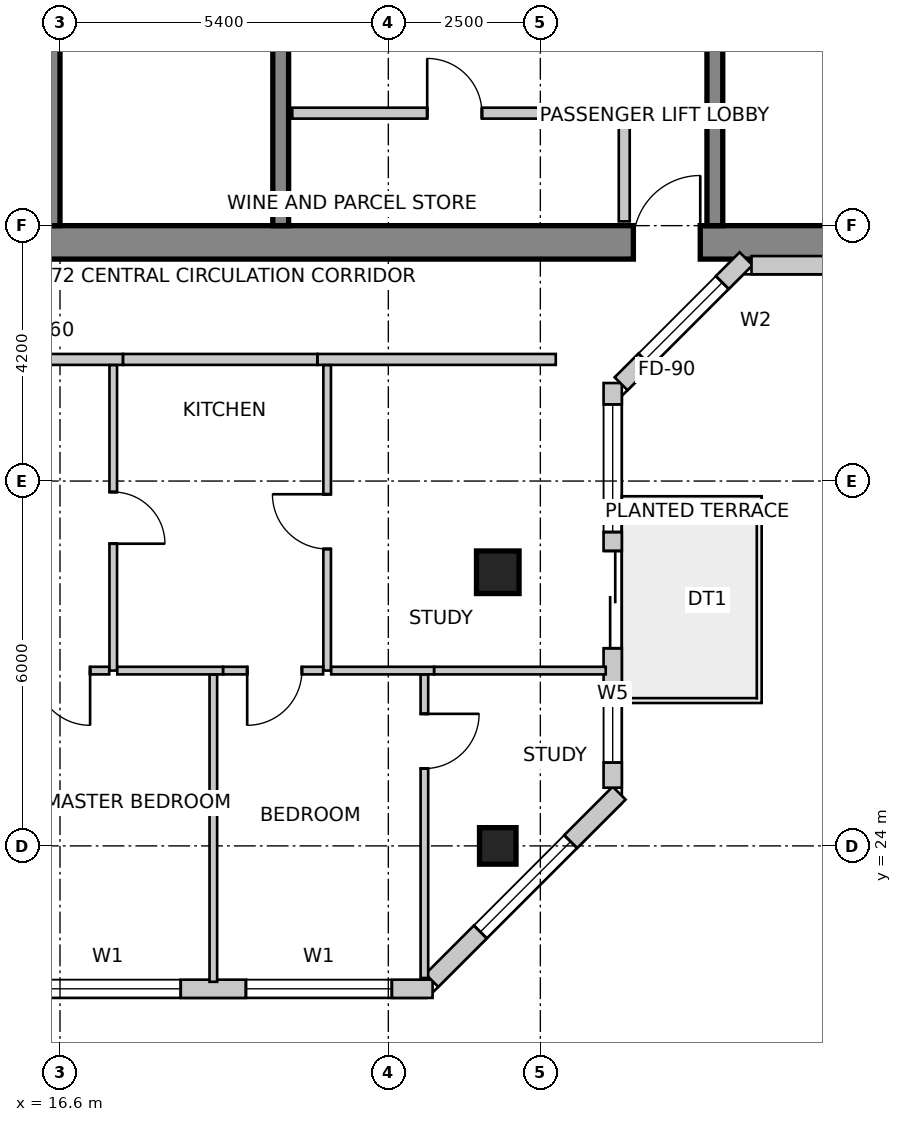
"""IFC4 building model, lengths in metres.
Left out: names, types, materials, properties, quantities, classifications, styles, units other than length and angle.
Written with IfcOpenShell. Run it as: python <this file> out.ifc"""

import sys

from ifc_helpers import new_model, si_unit, direction, frame, frame_2d, origin, origin_2d, place, context, subcontext, project, spatial, rectangle, extrude, source, transform, mapped, element, fill, save


model = new_model("IFC4")
c1 = context("Model", 3, precision=1e-05, world=origin(), true_north=direction((0.0, 1.0)))
c2 = subcontext(c1, "Body", "Model", "MODEL_VIEW")
j1 = project(units=[si_unit("LENGTHUNIT", "METRE"), si_unit("PLANEANGLEUNIT", "RADIAN")], contexts=[c1])
p1 = place(None, origin())
s1 = spatial("IfcSite", under=j1, at=p1, CompositionType="ELEMENT")
p2 = place(p1, origin())
s2 = spatial("IfcBuilding", under=s1, at=p2, CompositionType="ELEMENT")
p3 = place(p2, frame((0.0, 0.0, 281.7)))
s3 = spatial("IfcBuildingStorey", under=s2, at=p3, CompositionType="ELEMENT", Elevation=281.7)
p4 = place(p3, frame((16.05, 33.925, 0.0), z_axis=(0.0, 0.0, 1.0), x_axis=(1.0, 0.0, 0.0)))
e1 = element("IfcWall", 1, at=p4, inside=s3, PredefinedType="SHEAR", context=c2, shape_type="SweptSolid", body=[
    extrude(rectangle(XDim=15.5, YDim=0.55, at=frame_2d((7.75, 0.0))), origin(), (0.0, 0.0, 1.0), 3.6),
])
m1 = source(origin(), c2, "Body", "SweptSolid", [
    extrude(rectangle(XDim=1.1, YDim=2.15, at=frame_2d((0.55, 1.075))), frame((0.0, 0.285, 0.0), z_axis=(0.0, -1.0, 0.0), x_axis=(1.0, 0.0, 0.0)), (0.0, 0.0, 1.0), 0.57),
])
p5 = place(p4, frame((9.98, 0.0, 0.0)))
e2 = element("IfcOpeningElement", 2, at=p5, cuts=e1, PredefinedType="OPENING", context=c2, shape_type="MappedRepresentation", body=[
    mapped(m1, transform((0.0, 0.0, 0.0), scale=1.0)),
])
p6 = place(p3, frame((16.325, 34.2, 0.0), z_axis=(0.0, 0.0, 1.0), x_axis=(0.0, 1.0, 0.0)))
e3 = element("IfcWall", 3, at=p6, inside=s3, PredefinedType="SHEAR", context=c2, shape_type="SweptSolid", body=[
    extrude(rectangle(XDim=11.4, YDim=0.55, at=frame_2d((5.7, 0.0))), origin(), (0.0, 0.0, 1.0), 3.6),
])
p7 = place(p6, frame((7.15, 0.0, 0.0)))
e4 = element("IfcOpeningElement", 4, at=p7, cuts=e3, PredefinedType="OPENING", context=c2, shape_type="MappedRepresentation", body=[
    mapped(m1, transform((0.0, 0.0, 0.0), scale=1.0)),
])
p8 = place(p3, frame((20.23, 34.2, 0.0), z_axis=(0.0, 0.0, 1.0), x_axis=(0.0, 1.0, 0.0)))
e5 = element("IfcWall", 5, at=p8, inside=s3, PredefinedType="SHEAR", context=c2, shape_type="SweptSolid", body=[
    extrude(rectangle(XDim=9.06, YDim=0.26, at=frame_2d((4.53, 0.0))), origin(), (0.0, 0.0, 1.0), 3.6),
])
m2 = source(origin(), c2, "Body", "SweptSolid", [
    extrude(rectangle(XDim=1.1, YDim=2.15, at=frame_2d((0.55, 1.075))), frame((0.0, 0.14, 0.0), z_axis=(0.0, -1.0, 0.0), x_axis=(1.0, 0.0, 0.0)), (0.0, 0.0, 1.0), 0.28),
])
p9 = place(p8, frame((7.45, 0.0, 0.0)))
e6 = element("IfcOpeningElement", 6, at=p9, cuts=e5, PredefinedType="OPENING", context=c2, shape_type="MappedRepresentation", body=[
    mapped(m2, transform((0.0, 0.0, 0.0), scale=1.0)),
])
p10 = place(p3, frame((27.37, 34.2, 0.0), z_axis=(0.0, 0.0, 1.0), x_axis=(0.0, 1.0, 0.0)))
e7 = element("IfcWall", 7, at=p10, inside=s3, PredefinedType="SHEAR", context=c2, shape_type="SweptSolid", body=[
    extrude(rectangle(XDim=9.06, YDim=0.26, at=frame_2d((4.53, 0.0))), origin(), (0.0, 0.0, 1.0), 3.6),
])
p11 = place(p10, frame((7.45, 0.0, 0.0)))
e8 = element("IfcOpeningElement", 8, at=p11, cuts=e7, PredefinedType="OPENING", context=c2, shape_type="MappedRepresentation", body=[
    mapped(m2, transform((0.0, 0.0, 0.0), scale=1.0)),
])
m3 = source(origin(), c2, "Body", "SweptSolid", [
    extrude(rectangle(XDim=0.7, YDim=0.7, at=origin_2d()), origin(), (0.0, 0.0, 1.0), 3.6),
])
p12 = place(p3, frame((23.8, 28.5, 0.0), z_axis=(0.0, 0.0, 1.0), x_axis=(1.0, 0.0, 0.0)))
e9 = element("IfcColumn", 9, at=p12, inside=s3, PredefinedType="COLUMN", context=c2, shape_type="MappedRepresentation", body=[
    mapped(m3, transform((0.0, 0.0, 0.0), scale=1.0)),
])
m4 = source(origin(), c2, "Body", "SweptSolid", [
    extrude(rectangle(XDim=0.6, YDim=0.6, at=origin_2d()), origin(), (0.0, 0.0, 1.0), 3.6),
])
p13 = place(p3, frame((23.8, 24.0, 0.0), z_axis=(0.0, 0.0, 1.0), x_axis=(1.0, 0.0, 0.0)))
e10 = element("IfcColumn", 10, at=p13, inside=s3, PredefinedType="COLUMN", context=c2, shape_type="MappedRepresentation", body=[
    mapped(m4, transform((0.0, 0.0, 0.0), scale=1.0)),
])
p14 = place(p3, frame((12.086, 21.65, 0.0), z_axis=(0.0, 0.0, 1.0), x_axis=(1.0, 0.0, 0.0)))
e11 = element("IfcWall", 11, at=p14, inside=s3, PredefinedType="SOLIDWALL", context=c2, shape_type="SweptSolid", body=[
    extrude(rectangle(XDim=10.642, YDim=0.3, at=frame_2d((5.321, 0.0))), origin(), (0.0, 0.0, 1.0), 3.35),
])
m5 = source(origin(), c2, "Body", "SweptSolid", [
    extrude(rectangle(XDim=2.1, YDim=2.0, at=frame_2d((1.05, 1.0))), frame((0.0, 0.16, 0.0), z_axis=(0.0, -1.0, 0.0), x_axis=(1.0, 0.0, 0.0)), (0.0, 0.0, 1.0), 0.32),
])
p15 = place(p14, frame((1.139, 0.0, 0.85)))
e12 = element("IfcOpeningElement", 12, at=p15, cuts=e11, PredefinedType="OPENING", context=c2, shape_type="MappedRepresentation", body=[
    mapped(m5, transform((0.0, 0.0, 0.0), scale=1.0)),
])
m6 = source(origin(), c2, "Body", "SweptSolid", [
    extrude(rectangle(XDim=2.4, YDim=2.2, at=frame_2d((1.2, 1.1))), frame((0.0, 0.16, 0.0), z_axis=(0.0, -1.0, 0.0), x_axis=(1.0, 0.0, 0.0)), (0.0, 0.0, 1.0), 0.32),
])
p16 = place(p14, frame((4.1, 0.0, 0.85)))
e13 = element("IfcOpeningElement", 13, at=p16, cuts=e11, PredefinedType="OPENING", context=c2, shape_type="MappedRepresentation", body=[
    mapped(m6, transform((0.0, 0.0, 0.0), scale=1.0)),
])
p17 = place(p14, frame((7.572, 0.0, 0.85)))
e14 = element("IfcOpeningElement", 14, at=p17, cuts=e11, PredefinedType="OPENING", context=c2, shape_type="MappedRepresentation", body=[
    mapped(m6, transform((0.0, 0.0, 0.0), scale=1.0)),
])
p18 = place(p3, frame((22.716, 21.788, 0.0), z_axis=(0.0, 0.0, 1.0), x_axis=(0.707134803727, 0.707078757535, 0.0)))
e15 = element("IfcWall", 15, at=p18, inside=s3, PredefinedType="SOLIDWALL", context=c2, shape_type="SweptSolid", body=[
    extrude(rectangle(XDim=4.356, YDim=0.3, at=frame_2d((2.178, 0.0))), origin(), (0.0, 0.0, 1.0), 3.35),
])
p19 = place(p18, frame((1.128, 0.0, 0.85)))
e16 = element("IfcOpeningElement", 16, at=p19, cuts=e15, PredefinedType="OPENING", context=c2, shape_type="MappedRepresentation", body=[
    mapped(m5, transform((0.0, 0.0, 0.0), scale=1.0)),
])
p20 = place(p3, frame((25.69, 24.957, 0.0), z_axis=(0.0, 0.0, 1.0), x_axis=(0.0, 1.0, 0.0)))
e17 = element("IfcWall", 17, at=p20, inside=s3, PredefinedType="SOLIDWALL", context=c2, shape_type="SweptSolid", body=[
    extrude(rectangle(XDim=6.655, YDim=0.3, at=frame_2d((3.327, 0.0))), origin(), (0.0, 0.0, 1.0), 3.35),
])
m7 = source(origin(), c2, "Body", "SweptSolid", [
    extrude(rectangle(XDim=1.6, YDim=2.15, at=frame_2d((0.8, 1.075))), frame((0.0, 0.16, 0.0), z_axis=(0.0, -1.0, 0.0), x_axis=(1.0, 0.0, 0.0)), (0.0, 0.0, 1.0), 0.32),
])
p21 = place(p20, frame((2.293, 0.0, 0.0)))
e18 = element("IfcOpeningElement", 18, at=p21, cuts=e17, PredefinedType="OPENING", context=c2, shape_type="MappedRepresentation", body=[
    mapped(m7, transform((0.0, 0.0, 0.0), scale=1.0)),
])
m8 = source(origin(), c2, "Body", "SweptSolid", [
    extrude(rectangle(XDim=1.2, YDim=1.6, at=frame_2d((0.6, 0.8))), frame((0.0, 0.16, 0.0), z_axis=(0.0, -1.0, 0.0), x_axis=(1.0, 0.0, 0.0)), (0.0, 0.0, 1.0), 0.32),
])
p22 = place(p20, frame((0.413, 0.0, 0.85)))
e19 = element("IfcOpeningElement", 19, at=p22, cuts=e17, PredefinedType="OPENING", context=c2, shape_type="MappedRepresentation", body=[
    mapped(m8, transform((0.0, 0.0, 0.0), scale=1.0)),
])
p23 = place(p20, frame((4.204, 0.0, 0.85)))
e20 = element("IfcOpeningElement", 20, at=p23, cuts=e17, PredefinedType="OPENING", context=c2, shape_type="MappedRepresentation", body=[
    mapped(m5, transform((0.0, 0.0, 0.0), scale=1.0)),
])
p24 = place(p3, frame((25.828, 31.6, 0.0), z_axis=(0.0, 0.0, 1.0), x_axis=(0.707106781187, 0.707106781187, 0.0)))
e21 = element("IfcWall", 21, at=p24, inside=s3, PredefinedType="SOLIDWALL", context=c2, shape_type="SweptSolid", body=[
    extrude(rectangle(XDim=2.907, YDim=0.3, at=frame_2d((1.454, 0.0))), origin(), (0.0, 0.0, 1.0), 3.35),
])
m9 = source(origin(), c2, "Body", "SweptSolid", [
    extrude(rectangle(XDim=1.8, YDim=2.1, at=frame_2d((0.9, 1.05))), frame((0.0, 0.16, 0.0), z_axis=(0.0, -1.0, 0.0), x_axis=(1.0, 0.0, 0.0)), (0.0, 0.0, 1.0), 0.32),
])
p25 = place(p24, frame((0.554, 0.0, 0.85)))
e22 = element("IfcOpeningElement", 22, at=p25, cuts=e21, PredefinedType="OPENING", context=c2, shape_type="MappedRepresentation", body=[
    mapped(m9, transform((0.0, 0.0, 0.0), scale=1.0)),
])
p26 = place(p3, frame((27.973, 33.55, 0.0), z_axis=(0.0, 0.0, 1.0), x_axis=(1.0, 0.0, 0.0)))
e23 = element("IfcWall", 23, at=p26, inside=s3, PredefinedType="SOLIDWALL", context=c2, shape_type="SweptSolid", body=[
    extrude(rectangle(XDim=9.115, YDim=0.3, at=frame_2d((4.558, 0.0))), origin(), (0.0, 0.0, 1.0), 3.35),
])
p27 = place(p26, frame((1.239, 0.0, 0.85)))
e24 = element("IfcOpeningElement", 24, at=p27, cuts=e23, PredefinedType="OPENING", context=c2, shape_type="MappedRepresentation", body=[
    mapped(m6, transform((0.0, 0.0, 0.0), scale=1.0)),
])
p28 = place(p26, frame((5.626, 0.0, 0.85)))
e25 = element("IfcOpeningElement", 25, at=p28, cuts=e23, PredefinedType="OPENING", context=c2, shape_type="MappedRepresentation", body=[
    mapped(m5, transform((0.0, 0.0, 0.0), scale=1.0)),
])
p29 = place(p3, frame((20.42, 36.05, 0.0), z_axis=(0.0, 0.0, 1.0), x_axis=(1.0, 0.0, 0.0)))
e26 = element("IfcWall", 26, at=p29, inside=s3, PredefinedType="PARTITIONING", context=c2, shape_type="SweptSolid", body=[
    extrude(rectangle(XDim=5.46, YDim=0.18, at=frame_2d((2.73, 0.0))), origin(), (0.0, 0.0, 1.0), 3.35),
])
m10 = source(origin(), c2, "Body", "SweptSolid", [
    extrude(rectangle(XDim=0.9, YDim=2.15, at=frame_2d((0.45, 1.075))), frame((0.0, 0.1, 0.0), z_axis=(0.0, -1.0, 0.0), x_axis=(1.0, 0.0, 0.0)), (0.0, 0.0, 1.0), 0.2),
])
p30 = place(p29, frame((2.219, 0.0, 0.0)))
e27 = element("IfcOpeningElement", 27, at=p30, cuts=e26, PredefinedType="OPENING", context=c2, shape_type="MappedRepresentation", body=[
    mapped(m10, transform((0.0, 0.0, 0.0), scale=1.0)),
])
p31 = place(p3, frame((25.88, 35.956, 0.0), z_axis=(0.0, 0.0, 1.0), x_axis=(0.0, -1.0, 0.0)))
e28 = element("IfcWall", 28, at=p31, inside=s3, PredefinedType="PARTITIONING", context=c2, shape_type="SweptSolid", body=[
    extrude(rectangle(XDim=1.686, YDim=0.18, at=frame_2d((0.843, 0.0))), origin(), (0.0, 0.0, 1.0), 2.642),
])
p32 = place(p3, frame((24.754, 32.0, 0.0), z_axis=(0.0, 0.0, 1.0), x_axis=(-1.0, 0.0, 0.0)))
e29 = element("IfcWall", 29, at=p32, inside=s3, PredefinedType="PARTITIONING", context=c2, shape_type="SweptSolid", body=[
    extrude(rectangle(XDim=3.92, YDim=0.18, at=frame_2d((1.96, 0.0))), origin(), (0.0, 0.0, 1.0), 2.935),
])
p33 = place(p3, frame((17.636, 32.0, 0.0), z_axis=(0.0, 0.0, 1.0), x_axis=(-1.0, 0.0, 0.0)))
e30 = element("IfcWall", 30, at=p33, inside=s3, PredefinedType="PARTITIONING", context=c2, shape_type="SweptSolid", body=[
    extrude(rectangle(XDim=5.042, YDim=0.18, at=frame_2d((2.521, 0.0))), origin(), (0.0, 0.0, 1.0), 2.935),
])
p34 = place(p33, frame((2.009, 0.0, 0.0)))
e31 = element("IfcOpeningElement", 31, at=p34, cuts=e30, PredefinedType="OPENING", context=c2, shape_type="MappedRepresentation", body=[
    mapped(m10, transform((0.0, 0.0, 0.0), scale=1.0)),
])
p35 = place(p3, frame((20.832, 32.0, 0.0), z_axis=(0.0, 0.0, 1.0), x_axis=(-1.0, 0.0, 0.0)))
e32 = element("IfcWall", 32, at=p35, inside=s3, PredefinedType="PARTITIONING", context=c2, shape_type="SweptSolid", body=[
    extrude(rectangle(XDim=3.194, YDim=0.18, at=frame_2d((1.597, 0.0))), origin(), (0.0, 0.0, 1.0), 3.35),
])
p36 = place(p3, frame((20.994, 26.883, 0.0), z_axis=(0.0, 0.0, 1.0), x_axis=(0.0, 1.0, 0.0)))
e33 = element("IfcWall", 33, at=p36, inside=s3, PredefinedType="PARTITIONING", context=c2, shape_type="SweptSolid", body=[
    extrude(rectangle(XDim=5.023, YDim=0.125, at=frame_2d((2.511, 0.0))), origin(), (0.0, 0.0, 1.0), 2.935),
])
m11 = source(origin(), c2, "Body", "SweptSolid", [
    extrude(rectangle(XDim=0.9, YDim=2.15, at=frame_2d((0.45, 1.075))), frame((0.0, 0.073, 0.0), z_axis=(0.0, -1.0, 0.0), x_axis=(1.0, 0.0, 0.0)), (0.0, 0.0, 1.0), 0.145),
])
p37 = place(p36, frame((2.0, 0.0, 0.0)))
e34 = element("IfcOpeningElement", 34, at=p37, cuts=e33, PredefinedType="OPENING", context=c2, shape_type="MappedRepresentation", body=[
    mapped(m11, transform((0.0, 0.0, 0.0), scale=1.0)),
])
p38 = place(p3, frame((22.753, 26.883, 0.0), z_axis=(0.0, 0.0, 1.0), x_axis=(-1.0, 0.0, 0.0)))
e35 = element("IfcWall", 35, at=p38, inside=s3, PredefinedType="PARTITIONING", context=c2, shape_type="SweptSolid", body=[
    extrude(rectangle(XDim=1.692, YDim=0.125, at=frame_2d((0.846, 0.0))), origin(), (0.0, 0.0, 1.0), 3.35),
])
p39 = place(p3, frame((25.575, 26.883, 0.0), z_axis=(0.0, 0.0, 1.0), x_axis=(-1.0, 0.0, 0.0)))
e36 = element("IfcWall", 36, at=p39, inside=s3, PredefinedType="PARTITIONING", context=c2, shape_type="SweptSolid", body=[
    extrude(rectangle(XDim=2.82, YDim=0.125, at=frame_2d((1.41, 0.0))), origin(), (0.0, 0.0, 1.0), 2.642),
])
p40 = place(p3, frame((17.476, 31.906, 0.0), z_axis=(0.0, 0.0, 1.0), x_axis=(0.0, -1.0, 0.0)))
e37 = element("IfcWall", 37, at=p40, inside=s3, PredefinedType="PARTITIONING", context=c2, shape_type="SweptSolid", body=[
    extrude(rectangle(XDim=5.023, YDim=0.125, at=frame_2d((2.511, 0.0))), origin(), (0.0, 0.0, 1.0), 2.935),
])
m12 = source(origin(), c2, "Body", "SweptSolid", [
    extrude(rectangle(XDim=0.85, YDim=2.15, at=frame_2d((0.425, 1.075))), frame((0.0, 0.073, 0.0), z_axis=(0.0, -1.0, 0.0), x_axis=(1.0, 0.0, 0.0)), (0.0, 0.0, 1.0), 0.145),
])
p41 = place(p40, frame((2.086, 0.0, 0.0)))
e38 = element("IfcOpeningElement", 38, at=p41, cuts=e37, PredefinedType="OPENING", context=c2, shape_type="MappedRepresentation", body=[
    mapped(m12, transform((0.0, 0.0, 0.0), scale=1.0)),
])
p42 = place(p3, frame((17.409, 26.883, 0.0), z_axis=(0.0, 0.0, 1.0), x_axis=(-1.0, 0.0, 0.0)))
e39 = element("IfcWall", 39, at=p42, inside=s3, PredefinedType="PARTITIONING", context=c2, shape_type="SweptSolid", body=[
    extrude(rectangle(XDim=1.597, YDim=0.125, at=frame_2d((0.799, 0.0))), origin(), (0.0, 0.0, 1.0), 2.935),
])
p43 = place(p42, frame((0.314, 0.0, 0.0)))
e40 = element("IfcOpeningElement", 40, at=p43, cuts=e39, PredefinedType="OPENING", context=c2, shape_type="MappedRepresentation", body=[
    mapped(m11, transform((0.0, 0.0, 0.0), scale=1.0)),
])
p44 = place(p3, frame((19.282, 26.883, 0.0), z_axis=(0.0, 0.0, 1.0), x_axis=(-1.0, 0.0, 0.0)))
e41 = element("IfcWall", 41, at=p44, inside=s3, PredefinedType="PARTITIONING", context=c2, shape_type="SweptSolid", body=[
    extrude(rectangle(XDim=1.74, YDim=0.125, at=frame_2d((0.87, 0.0))), origin(), (0.0, 0.0, 1.0), 3.35),
])
p45 = place(p3, frame((20.927, 26.883, 0.0), z_axis=(0.0, 0.0, 1.0), x_axis=(-1.0, 0.0, 0.0)))
e42 = element("IfcWall", 42, at=p45, inside=s3, PredefinedType="PARTITIONING", context=c2, shape_type="SweptSolid", body=[
    extrude(rectangle(XDim=1.644, YDim=0.125, at=frame_2d((0.822, 0.0))), origin(), (0.0, 0.0, 1.0), 3.35),
])
p46 = place(p45, frame((0.349, 0.0, 0.0)))
e43 = element("IfcOpeningElement", 43, at=p46, cuts=e42, PredefinedType="OPENING", context=c2, shape_type="MappedRepresentation", body=[
    mapped(m11, transform((0.0, 0.0, 0.0), scale=1.0)),
])
p47 = place(p3, frame((19.122, 26.816, 0.0), z_axis=(0.0, 0.0, 1.0), x_axis=(0.0, -1.0, 0.0)))
e44 = element("IfcWall", 44, at=p47, inside=s3, PredefinedType="PARTITIONING", context=c2, shape_type="SweptSolid", body=[
    extrude(rectangle(XDim=5.052, YDim=0.125, at=frame_2d((2.526, 0.0))), origin(), (0.0, 0.0, 1.0), 2.935),
])
p48 = place(p3, frame((22.593, 26.816, 0.0), z_axis=(0.0, 0.0, 1.0), x_axis=(0.0, -1.0, 0.0)))
e45 = element("IfcWall", 45, at=p48, inside=s3, PredefinedType="PARTITIONING", context=c2, shape_type="SweptSolid", body=[
    extrude(rectangle(XDim=4.989, YDim=0.125, at=frame_2d((2.494, 0.0))), origin(), (0.0, 0.0, 1.0), 2.935),
])
p49 = place(p48, frame((0.645, 0.0, 0.0)))
e46 = element("IfcOpeningElement", 46, at=p49, cuts=e45, PredefinedType="OPENING", context=c2, shape_type="MappedRepresentation", body=[
    mapped(m11, transform((0.0, 0.0, 0.0), scale=1.0)),
])
m13 = source(origin(), c2, "Body", "SweptSolid", [
    extrude(rectangle(XDim=2.4, YDim=2.2, at=frame_2d((1.2, 1.1))), frame((0.0, -0.015, 0.0), z_axis=(0.0, -1.0, 0.0), x_axis=(1.0, 0.0, 0.0)), (0.0, 0.0, 1.0), 0.06),
])
p50 = place(p16, origin())
e47 = element("IfcWindow", 47, at=p50, inside=s3, PartitioningType="SINGLE_PANEL", PredefinedType="WINDOW", context=c2, shape_type="MappedRepresentation", body=[
    mapped(m13, transform((0.0, 0.0, 0.0), scale=1.0)),
])
fill(e13, e47)
p51 = place(p17, origin())
e48 = element("IfcWindow", 48, at=p51, inside=s3, PartitioningType="SINGLE_PANEL", PredefinedType="WINDOW", context=c2, shape_type="MappedRepresentation", body=[
    mapped(m13, transform((0.0, 0.0, 0.0), scale=1.0)),
])
fill(e14, e48)
m14 = source(origin(), c2, "Body", "SweptSolid", [
    extrude(rectangle(XDim=2.1, YDim=2.0, at=frame_2d((1.05, 1.0))), frame((0.0, -0.015, 0.0), z_axis=(0.0, -1.0, 0.0), x_axis=(1.0, 0.0, 0.0)), (0.0, 0.0, 1.0), 0.06),
])
p52 = place(p19, origin())
e49 = element("IfcWindow", 49, at=p52, inside=s3, PartitioningType="SINGLE_PANEL", PredefinedType="WINDOW", context=c2, shape_type="MappedRepresentation", body=[
    mapped(m14, transform((0.0, 0.0, 0.0), scale=1.0)),
])
fill(e16, e49)
m15 = source(origin(), c2, "Body", "SweptSolid", [
    extrude(rectangle(XDim=1.6, YDim=2.15, at=frame_2d((0.8, 1.075))), frame((0.0, 0.025, 0.0), z_axis=(0.0, -1.0, 0.0), x_axis=(1.0, 0.0, 0.0)), (0.0, 0.0, 1.0), 0.05),
])
p53 = place(p21, origin())
e50 = element("IfcDoor", 50, at=p53, inside=s3, OperationType="DOUBLE_DOOR_SLIDING", PredefinedType="DOOR", context=c2, shape_type="MappedRepresentation", body=[
    mapped(m15, transform((0.0, 0.0, 0.0), scale=1.0)),
])
fill(e18, e50)
m16 = source(origin(), c2, "Body", "SweptSolid", [
    extrude(rectangle(XDim=1.2, YDim=1.6, at=frame_2d((0.6, 0.8))), frame((0.0, -0.015, 0.0), z_axis=(0.0, -1.0, 0.0), x_axis=(1.0, 0.0, 0.0)), (0.0, 0.0, 1.0), 0.06),
])
p54 = place(p22, origin())
e51 = element("IfcWindow", 51, at=p54, inside=s3, PartitioningType="SINGLE_PANEL", PredefinedType="WINDOW", context=c2, shape_type="MappedRepresentation", body=[
    mapped(m16, transform((0.0, 0.0, 0.0), scale=1.0)),
])
fill(e19, e51)
p55 = place(p23, origin())
e52 = element("IfcWindow", 52, at=p55, inside=s3, PartitioningType="SINGLE_PANEL", PredefinedType="WINDOW", context=c2, shape_type="MappedRepresentation", body=[
    mapped(m14, transform((0.0, 0.0, 0.0), scale=1.0)),
])
fill(e20, e52)
m17 = source(origin(), c2, "Body", "SweptSolid", [
    extrude(rectangle(XDim=1.8, YDim=2.1, at=frame_2d((0.9, 1.05))), frame((0.0, -0.015, 0.0), z_axis=(0.0, -1.0, 0.0), x_axis=(1.0, 0.0, 0.0)), (0.0, 0.0, 1.0), 0.06),
])
p56 = place(p25, origin())
e53 = element("IfcWindow", 53, at=p56, inside=s3, PartitioningType="SINGLE_PANEL", PredefinedType="WINDOW", context=c2, shape_type="MappedRepresentation", body=[
    mapped(m17, transform((0.0, 0.0, 0.0), scale=1.0)),
])
fill(e22, e53)
m18 = source(origin(), c2, "Body", "SweptSolid", [
    extrude(rectangle(XDim=1.1, YDim=2.15, at=frame_2d((0.55, 1.075))), frame((0.0, 0.025, 0.0), z_axis=(0.0, -1.0, 0.0), x_axis=(1.0, 0.0, 0.0)), (0.0, 0.0, 1.0), 0.05),
])
p57 = place(p5, origin())
e54 = element("IfcDoor", 54, at=p57, inside=s3, OperationType="SINGLE_SWING_RIGHT", PredefinedType="DOOR", context=c2, shape_type="MappedRepresentation", body=[
    mapped(m18, transform((0.0, 0.0, 0.0), scale=1.0)),
])
fill(e2, e54)
m19 = source(origin(), c2, "Body", "SweptSolid", [
    extrude(rectangle(XDim=0.9, YDim=2.15, at=frame_2d((0.45, 1.075))), frame((0.0, 0.025, 0.0), z_axis=(0.0, -1.0, 0.0), x_axis=(1.0, 0.0, 0.0)), (0.0, 0.0, 1.0), 0.05),
])
p58 = place(p30, origin())
e55 = element("IfcDoor", 55, at=p58, inside=s3, OperationType="SINGLE_SWING_LEFT", PredefinedType="DOOR", context=c2, shape_type="MappedRepresentation", body=[
    mapped(m19, transform((0.0, 0.0, 0.0), scale=1.0)),
])
fill(e27, e55)
m20 = source(origin(), c2, "Body", "SweptSolid", [
    extrude(rectangle(XDim=0.9, YDim=2.15, at=frame_2d((0.45, 1.075))), frame((0.0, 0.025, 0.0), z_axis=(0.0, -1.0, 0.0), x_axis=(1.0, 0.0, 0.0)), (0.0, 0.0, 1.0), 0.05),
])
p59 = place(p37, origin())
e56 = element("IfcDoor", 56, at=p59, inside=s3, OperationType="SINGLE_SWING_RIGHT", PredefinedType="DOOR", context=c2, shape_type="MappedRepresentation", body=[
    mapped(m20, transform((0.0, 0.0, 0.0), scale=1.0)),
])
fill(e34, e56)
m21 = source(origin(), c2, "Body", "SweptSolid", [
    extrude(rectangle(XDim=0.85, YDim=2.15, at=frame_2d((0.425, 1.075))), frame((0.0, 0.025, 0.0), z_axis=(0.0, -1.0, 0.0), x_axis=(1.0, 0.0, 0.0)), (0.0, 0.0, 1.0), 0.05),
])
p60 = place(p41, origin())
e57 = element("IfcDoor", 57, at=p60, inside=s3, OperationType="SINGLE_SWING_RIGHT", PredefinedType="DOOR", context=c2, shape_type="MappedRepresentation", body=[
    mapped(m21, transform((0.0, 0.0, 0.0), scale=1.0)),
])
fill(e38, e57)
p61 = place(p43, origin())
e58 = element("IfcDoor", 58, at=p61, inside=s3, OperationType="SINGLE_SWING_LEFT", PredefinedType="DOOR", context=c2, shape_type="MappedRepresentation", body=[
    mapped(m20, transform((0.0, 0.0, 0.0), scale=1.0)),
])
fill(e40, e58)
p62 = place(p46, origin())
e59 = element("IfcDoor", 59, at=p62, inside=s3, OperationType="SINGLE_SWING_RIGHT", PredefinedType="DOOR", context=c2, shape_type="MappedRepresentation", body=[
    mapped(m20, transform((0.0, 0.0, 0.0), scale=1.0)),
])
fill(e43, e59)
p63 = place(p49, origin())
e60 = element("IfcDoor", 60, at=p63, inside=s3, OperationType="SINGLE_SWING_LEFT", PredefinedType="DOOR", context=c2, shape_type="MappedRepresentation", body=[
    mapped(m20, transform((0.0, 0.0, 0.0), scale=1.0)),
])
fill(e46, e60)
save(model, sys.argv[1])
